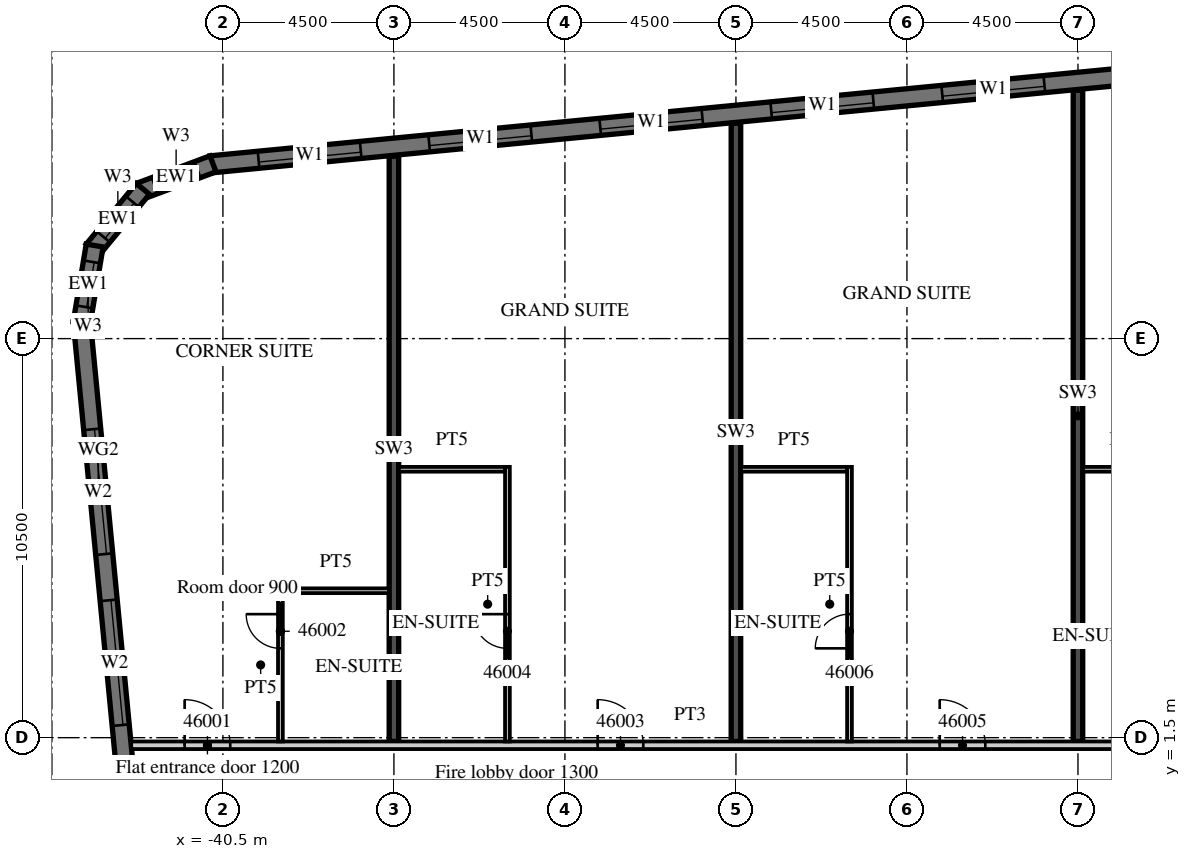
"""IFC4 building model, lengths in metres.
Left out: names, types, materials, properties, quantities, classifications, styles, units other than length and angle.
Written with IfcOpenShell. Run it as: python <this file> out.ifc"""

import sys

from ifc_helpers import new_model, si_unit, direction, frame, frame_2d, origin, place, context, subcontext, project, spatial, polyline, rectangle, outline, extrude, element, fill, save


model = new_model("IFC4")
c1 = context("Model", 3, precision=1e-05, world=origin(), true_north=direction((0.0, 1.0)))
c2 = subcontext(c1, "Body", "Model", "MODEL_VIEW")
j1 = project(units=[si_unit("LENGTHUNIT", "METRE"), si_unit("PLANEANGLEUNIT", "RADIAN")], contexts=[c1])
p1 = place(None, origin())
s1 = spatial("IfcSite", under=j1, at=p1, CompositionType="ELEMENT")
p2 = place(p1, origin())
s2 = spatial("IfcBuilding", under=s1, at=p2, CompositionType="ELEMENT")
p3 = place(p2, frame((0.0, 0.0, 193.3)))
s3 = spatial("IfcBuildingStorey", under=s2, at=p3, CompositionType="ELEMENT", Elevation=193.3)
p4 = place(p3, frame((-36.0, 1.4, 0.0), z_axis=(0.0, 0.0, 1.0), x_axis=(0.0, 1.0, 0.0)))
e1 = element("IfcWall", 1, at=p4, inside=s3, PredefinedType="SHEAR", context=c2, shape_type="SweptSolid", body=[
    extrude(rectangle(XDim=15.401, YDim=0.25, at=frame_2d((7.701, 0.0))), origin(), (0.0, 0.0, 1.0), 3.3),
])
p5 = place(p3, frame((-27.0, 1.4, 0.0), z_axis=(0.0, 0.0, 1.0), x_axis=(0.0, 1.0, 0.0)))
e2 = element("IfcWall", 2, at=p5, inside=s3, PredefinedType="SHEAR", context=c2, shape_type="SweptSolid", body=[
    extrude(rectangle(XDim=16.268, YDim=0.25, at=frame_2d((8.134, 0.0))), origin(), (0.0, 0.0, 1.0), 3.3),
])
p6 = place(p3, frame((-18.0, 1.4, 0.0), z_axis=(0.0, 0.0, 1.0), x_axis=(0.0, 1.0, 0.0)))
e3 = element("IfcWall", 3, at=p6, inside=s3, PredefinedType="SHEAR", context=c2, shape_type="SweptSolid", body=[
    extrude(rectangle(XDim=17.134, YDim=0.25, at=frame_2d((8.567, 0.0))), origin(), (0.0, 0.0, 1.0), 3.3),
])
p7 = place(p3, frame((-44.214, 12.466, 0.0), z_axis=(0.0, 0.0, 1.0), x_axis=(0.095847314626, -0.995396047952, 0.0)))
e4 = element("IfcWall", 4, at=p7, inside=s3, PredefinedType="SOLIDWALL", context=c2, shape_type="SweptSolid", body=[
    extrude(rectangle(XDim=34.0, YDim=0.45, at=frame_2d((17.0, 0.0))), origin(), (0.0, 0.0, 1.0), 3.02),
])
p8 = place(p7, frame((2.865, 0.0, 0.45)))
e5 = element("IfcOpeningElement", 5, at=p8, cuts=e4, PredefinedType="OPENING", context=c2, shape_type="SweptSolid", body=[
    extrude(rectangle(XDim=3.3, YDim=2.25, at=frame_2d((1.65, 1.125))), frame((0.0, 0.235, 0.0), z_axis=(0.0, -1.0, 0.0), x_axis=(1.0, 0.0, 0.0)), (0.0, 0.0, 1.0), 0.47),
])
p9 = place(p7, frame((7.386, 0.0, 0.45)))
e6 = element("IfcOpeningElement", 6, at=p9, cuts=e4, PredefinedType="OPENING", context=c2, shape_type="SweptSolid", body=[
    extrude(rectangle(XDim=3.3, YDim=2.25, at=frame_2d((1.65, 1.125))), frame((0.0, 0.235, 0.0), z_axis=(0.0, -1.0, 0.0), x_axis=(1.0, 0.0, 0.0)), (0.0, 0.0, 1.0), 0.47),
])
p10 = place(p3, frame((13.521, 21.817, 0.0), z_axis=(0.0, 0.0, 1.0), x_axis=(-0.995396508751, -0.095842529008, 0.0)))
e7 = element("IfcWall", 7, at=p10, inside=s3, PredefinedType="SOLIDWALL", context=c2, shape_type="SweptSolid", body=[
    extrude(rectangle(XDim=54.591, YDim=0.45, at=frame_2d((27.296, 0.0))), origin(), (0.0, 0.0, 1.0), 3.02),
])
p11 = place(p10, frame((0.91, 0.0, 0.45)))
e8 = element("IfcOpeningElement", 8, at=p11, cuts=e7, PredefinedType="OPENING", context=c2, shape_type="SweptSolid", body=[
    extrude(rectangle(XDim=2.7, YDim=2.25, at=frame_2d((1.35, 1.125))), frame((0.0, 0.235, 0.0), z_axis=(0.0, -1.0, 0.0), x_axis=(1.0, 0.0, 0.0)), (0.0, 0.0, 1.0), 0.47),
])
p12 = place(p10, frame((5.431, 0.0, 0.45)))
e9 = element("IfcOpeningElement", 9, at=p12, cuts=e7, PredefinedType="OPENING", context=c2, shape_type="SweptSolid", body=[
    extrude(rectangle(XDim=2.7, YDim=2.25, at=frame_2d((1.35, 1.125))), frame((0.0, 0.235, 0.0), z_axis=(0.0, -1.0, 0.0), x_axis=(1.0, 0.0, 0.0)), (0.0, 0.0, 1.0), 0.47),
])
p13 = place(p10, frame((9.952, 0.0, 0.45)))
e10 = element("IfcOpeningElement", 10, at=p13, cuts=e7, PredefinedType="OPENING", context=c2, shape_type="SweptSolid", body=[
    extrude(rectangle(XDim=2.7, YDim=2.25, at=frame_2d((1.35, 1.125))), frame((0.0, 0.235, 0.0), z_axis=(0.0, -1.0, 0.0), x_axis=(1.0, 0.0, 0.0)), (0.0, 0.0, 1.0), 0.47),
])
p14 = place(p10, frame((14.473, 0.0, 0.45)))
e11 = element("IfcOpeningElement", 11, at=p14, cuts=e7, PredefinedType="OPENING", context=c2, shape_type="SweptSolid", body=[
    extrude(rectangle(XDim=2.7, YDim=2.25, at=frame_2d((1.35, 1.125))), frame((0.0, 0.235, 0.0), z_axis=(0.0, -1.0, 0.0), x_axis=(1.0, 0.0, 0.0)), (0.0, 0.0, 1.0), 0.47),
])
p15 = place(p10, frame((18.994, 0.0, 0.45)))
e12 = element("IfcOpeningElement", 12, at=p15, cuts=e7, PredefinedType="OPENING", context=c2, shape_type="SweptSolid", body=[
    extrude(rectangle(XDim=2.7, YDim=2.25, at=frame_2d((1.35, 1.125))), frame((0.0, 0.235, 0.0), z_axis=(0.0, -1.0, 0.0), x_axis=(1.0, 0.0, 0.0)), (0.0, 0.0, 1.0), 0.47),
])
p16 = place(p10, frame((23.514, 0.0, 0.45)))
e13 = element("IfcOpeningElement", 13, at=p16, cuts=e7, PredefinedType="OPENING", context=c2, shape_type="SweptSolid", body=[
    extrude(rectangle(XDim=2.7, YDim=2.25, at=frame_2d((1.35, 1.125))), frame((0.0, 0.235, 0.0), z_axis=(0.0, -1.0, 0.0), x_axis=(1.0, 0.0, 0.0)), (0.0, 0.0, 1.0), 0.47),
])
p17 = place(p10, frame((28.035, 0.0, 0.45)))
e14 = element("IfcOpeningElement", 14, at=p17, cuts=e7, PredefinedType="OPENING", context=c2, shape_type="SweptSolid", body=[
    extrude(rectangle(XDim=2.7, YDim=2.25, at=frame_2d((1.35, 1.125))), frame((0.0, 0.235, 0.0), z_axis=(0.0, -1.0, 0.0), x_axis=(1.0, 0.0, 0.0)), (0.0, 0.0, 1.0), 0.47),
])
p18 = place(p10, frame((32.556, 0.0, 0.45)))
e15 = element("IfcOpeningElement", 15, at=p18, cuts=e7, PredefinedType="OPENING", context=c2, shape_type="SweptSolid", body=[
    extrude(rectangle(XDim=2.7, YDim=2.25, at=frame_2d((1.35, 1.125))), frame((0.0, 0.235, 0.0), z_axis=(0.0, -1.0, 0.0), x_axis=(1.0, 0.0, 0.0)), (0.0, 0.0, 1.0), 0.47),
])
p19 = place(p10, frame((37.077, 0.0, 0.45)))
e16 = element("IfcOpeningElement", 16, at=p19, cuts=e7, PredefinedType="OPENING", context=c2, shape_type="SweptSolid", body=[
    extrude(rectangle(XDim=2.7, YDim=2.25, at=frame_2d((1.35, 1.125))), frame((0.0, 0.235, 0.0), z_axis=(0.0, -1.0, 0.0), x_axis=(1.0, 0.0, 0.0)), (0.0, 0.0, 1.0), 0.47),
])
p20 = place(p10, frame((41.598, 0.0, 0.45)))
e17 = element("IfcOpeningElement", 17, at=p20, cuts=e7, PredefinedType="OPENING", context=c2, shape_type="SweptSolid", body=[
    extrude(rectangle(XDim=2.7, YDim=2.25, at=frame_2d((1.35, 1.125))), frame((0.0, 0.235, 0.0), z_axis=(0.0, -1.0, 0.0), x_axis=(1.0, 0.0, 0.0)), (0.0, 0.0, 1.0), 0.47),
])
p21 = place(p10, frame((46.118, 0.0, 0.45)))
e18 = element("IfcOpeningElement", 18, at=p21, cuts=e7, PredefinedType="OPENING", context=c2, shape_type="SweptSolid", body=[
    extrude(rectangle(XDim=2.7, YDim=2.25, at=frame_2d((1.35, 1.125))), frame((0.0, 0.235, 0.0), z_axis=(0.0, -1.0, 0.0), x_axis=(1.0, 0.0, 0.0)), (0.0, 0.0, 1.0), 0.47),
])
p22 = place(p10, frame((50.629, 0.0, 0.45)))
e19 = element("IfcOpeningElement", 19, at=p22, cuts=e7, PredefinedType="OPENING", context=c2, shape_type="SweptSolid", body=[
    extrude(rectangle(XDim=2.7, YDim=2.25, at=frame_2d((1.35, 1.125))), frame((0.0, 0.235, 0.0), z_axis=(0.0, -1.0, 0.0), x_axis=(1.0, 0.0, 0.0)), (0.0, 0.0, 1.0), 0.47),
])
p23 = place(p3, frame((-40.761, 16.598, 0.0), z_axis=(0.0, 0.0, 1.0), x_axis=(-0.936677599948, -0.350192909346, 0.0)))
e20 = element("IfcWall", 20, at=p23, inside=s3, PredefinedType="SOLIDWALL", context=c2, shape_type="SweptSolid", body=[
    extrude(outline(polyline([(0.0, -0.225), (2.071, -0.225), (1.95, 0.225), (0.121, 0.225), (0.0, -0.225)])), origin(), (0.0, 0.0, 1.0), 3.02),
])
p24 = place(p23, frame((0.435, 0.0, 0.45)))
e21 = element("IfcOpeningElement", 21, at=p24, cuts=e20, PredefinedType="OPENING", context=c2, shape_type="SweptSolid", body=[
    extrude(rectangle(XDim=1.2, YDim=2.25, at=frame_2d((0.6, 1.125))), frame((0.0, 0.235, 0.0), z_axis=(0.0, -1.0, 0.0), x_axis=(1.0, 0.0, 0.0)), (0.0, 0.0, 1.0), 0.47),
])
p25 = place(p3, frame((-42.606, 15.941, 0.0), z_axis=(0.0, 0.0, 1.0), x_axis=(-0.636116318187, -0.771593176315, 0.0)))
e22 = element("IfcWall", 22, at=p25, inside=s3, PredefinedType="SOLIDWALL", context=c2, shape_type="SweptSolid", body=[
    extrude(outline(polyline([(0.0, -0.225), (2.071, -0.225), (1.95, 0.225), (0.121, 0.225), (0.0, -0.225)])), origin(), (0.0, 0.0, 1.0), 3.02),
])
p26 = place(p25, frame((0.435, 0.0, 0.45)))
e23 = element("IfcOpeningElement", 23, at=p26, cuts=e22, PredefinedType="OPENING", context=c2, shape_type="SweptSolid", body=[
    extrude(rectangle(XDim=1.2, YDim=2.25, at=frame_2d((0.6, 1.125))), frame((0.0, 0.235, 0.0), z_axis=(0.0, -1.0, 0.0), x_axis=(1.0, 0.0, 0.0)), (0.0, 0.0, 1.0), 0.47),
])
p27 = place(p3, frame((-43.875, 14.449, 0.0), z_axis=(0.0, 0.0, 1.0), x_axis=(-0.164953448126, -0.986301353518, 0.0)))
e24 = element("IfcWall", 24, at=p27, inside=s3, PredefinedType="SOLIDWALL", context=c2, shape_type="SweptSolid", body=[
    extrude(outline(polyline([(0.0, -0.225), (2.071, -0.225), (1.95, 0.225), (0.121, 0.225), (0.0, -0.225)])), origin(), (0.0, 0.0, 1.0), 3.02),
])
p28 = place(p27, frame((0.435, 0.0, 0.45)))
e25 = element("IfcOpeningElement", 25, at=p28, cuts=e24, PredefinedType="OPENING", context=c2, shape_type="SweptSolid", body=[
    extrude(rectangle(XDim=1.2, YDim=2.25, at=frame_2d((0.6, 1.125))), frame((0.0, 0.235, 0.0), z_axis=(0.0, -1.0, 0.0), x_axis=(1.0, 0.0, 0.0)), (0.0, 0.0, 1.0), 0.47),
])
p29 = place(p3, frame((-42.913, 1.3, 0.0), z_axis=(0.0, 0.0, 1.0), x_axis=(1.0, 0.0, 0.0)))
e26 = element("IfcWall", 26, at=p29, inside=s3, PredefinedType="PARTITIONING", context=c2, shape_type="SweptSolid", body=[
    extrude(rectangle(XDim=29.413, YDim=0.2, at=frame_2d((14.707, 0.0))), origin(), (0.0, 0.0, 1.0), 3.02),
])
p30 = place(p29, frame((1.406, 0.0, 0.0)))
e27 = element("IfcOpeningElement", 27, at=p30, cuts=e26, PredefinedType="OPENING", context=c2, shape_type="SweptSolid", body=[
    extrude(rectangle(XDim=1.2, YDim=2.1, at=frame_2d((0.6, 1.05))), frame((0.0, 0.11, 0.0), z_axis=(0.0, -1.0, 0.0), x_axis=(1.0, 0.0, 0.0)), (0.0, 0.0, 1.0), 0.22),
])
p31 = place(p29, frame((12.275, 0.0, 0.0)))
e28 = element("IfcOpeningElement", 28, at=p31, cuts=e26, PredefinedType="OPENING", context=c2, shape_type="SweptSolid", body=[
    extrude(rectangle(XDim=1.2, YDim=2.1, at=frame_2d((0.6, 1.05))), frame((0.0, 0.11, 0.0), z_axis=(0.0, -1.0, 0.0), x_axis=(1.0, 0.0, 0.0)), (0.0, 0.0, 1.0), 0.22),
])
p32 = place(p29, frame((21.275, 0.0, 0.0)))
e29 = element("IfcOpeningElement", 29, at=p32, cuts=e26, PredefinedType="OPENING", context=c2, shape_type="SweptSolid", body=[
    extrude(rectangle(XDim=1.2, YDim=2.1, at=frame_2d((0.6, 1.05))), frame((0.0, 0.11, 0.0), z_axis=(0.0, -1.0, 0.0), x_axis=(1.0, 0.0, 0.0)), (0.0, 0.0, 1.0), 0.22),
])
p33 = place(p29, frame((27.838, 0.0, 0.0)))
e30 = element("IfcOpeningElement", 30, at=p33, cuts=e26, PredefinedType="OPENING", context=c2, shape_type="SweptSolid", body=[
    extrude(rectangle(XDim=1.0, YDim=2.1, at=frame_2d((0.5, 1.05))), frame((0.0, 0.11, 0.0), z_axis=(0.0, -1.0, 0.0), x_axis=(1.0, 0.0, 0.0)), (0.0, 0.0, 1.0), 0.22),
])
p34 = place(p3, frame((-38.987, 1.4, 0.0), z_axis=(0.0, 0.0, 1.0), x_axis=(0.0, 1.0, 0.0)))
e31 = element("IfcWall", 31, at=p34, inside=s3, PredefinedType="PARTITIONING", context=c2, shape_type="SweptSolid", body=[
    extrude(rectangle(XDim=4.028, YDim=0.125, at=frame_2d((2.014, 0.0))), origin(), (0.0, 0.0, 1.0), 3.02),
])
p35 = place(p34, frame((2.45, 0.0, 0.0)))
e32 = element("IfcOpeningElement", 32, at=p35, cuts=e31, PredefinedType="OPENING", context=c2, shape_type="SweptSolid", body=[
    extrude(rectangle(XDim=0.9, YDim=2.1, at=frame_2d((0.45, 1.05))), frame((0.0, 0.073, 0.0), z_axis=(0.0, -1.0, 0.0), x_axis=(1.0, 0.0, 0.0)), (0.0, 0.0, 1.0), 0.145),
])
p36 = place(p3, frame((-38.925, 5.366, 0.0), z_axis=(0.0, 0.0, 1.0), x_axis=(1.0, 0.0, 0.0)))
e33 = element("IfcWall", 33, at=p36, inside=s3, PredefinedType="PARTITIONING", context=c2, shape_type="SweptSolid", body=[
    extrude(rectangle(XDim=2.8, YDim=0.125, at=frame_2d((1.4, 0.0))), origin(), (0.0, 0.0, 1.0), 3.02),
])
p37 = place(p3, frame((-33.013, 1.4, 0.0), z_axis=(0.0, 0.0, 1.0), x_axis=(0.0, 1.0, 0.0)))
e34 = element("IfcWall", 34, at=p37, inside=s3, PredefinedType="PARTITIONING", context=c2, shape_type="SweptSolid", body=[
    extrude(rectangle(XDim=7.225, YDim=0.125, at=frame_2d((3.613, 0.0))), origin(), (0.0, 0.0, 1.0), 3.02),
])
p38 = place(p37, frame((2.45, 0.0, 0.0)))
e35 = element("IfcOpeningElement", 35, at=p38, cuts=e34, PredefinedType="OPENING", context=c2, shape_type="SweptSolid", body=[
    extrude(rectangle(XDim=0.9, YDim=2.1, at=frame_2d((0.45, 1.05))), frame((0.0, 0.073, 0.0), z_axis=(0.0, -1.0, 0.0), x_axis=(1.0, 0.0, 0.0)), (0.0, 0.0, 1.0), 0.145),
])
p39 = place(p3, frame((-35.875, 8.562, 0.0), z_axis=(0.0, 0.0, 1.0), x_axis=(1.0, 0.0, 0.0)))
e36 = element("IfcWall", 36, at=p39, inside=s3, PredefinedType="PARTITIONING", context=c2, shape_type="SweptSolid", body=[
    extrude(rectangle(XDim=2.8, YDim=0.125, at=frame_2d((1.4, 0.0))), origin(), (0.0, 0.0, 1.0), 3.02),
])
p40 = place(p3, frame((-24.012, 1.4, 0.0), z_axis=(0.0, 0.0, 1.0), x_axis=(0.0, 1.0, 0.0)))
e37 = element("IfcWall", 37, at=p40, inside=s3, PredefinedType="PARTITIONING", context=c2, shape_type="SweptSolid", body=[
    extrude(rectangle(XDim=7.225, YDim=0.125, at=frame_2d((3.613, 0.0))), origin(), (0.0, 0.0, 1.0), 3.02),
])
p41 = place(p40, frame((2.45, 0.0, 0.0)))
e38 = element("IfcOpeningElement", 38, at=p41, cuts=e37, PredefinedType="OPENING", context=c2, shape_type="SweptSolid", body=[
    extrude(rectangle(XDim=0.9, YDim=2.1, at=frame_2d((0.45, 1.05))), frame((0.0, 0.073, 0.0), z_axis=(0.0, -1.0, 0.0), x_axis=(1.0, 0.0, 0.0)), (0.0, 0.0, 1.0), 0.145),
])
p42 = place(p3, frame((-26.875, 8.562, 0.0), z_axis=(0.0, 0.0, 1.0), x_axis=(1.0, 0.0, 0.0)))
e39 = element("IfcWall", 39, at=p42, inside=s3, PredefinedType="PARTITIONING", context=c2, shape_type="SweptSolid", body=[
    extrude(rectangle(XDim=2.8, YDim=0.125, at=frame_2d((1.4, 0.0))), origin(), (0.0, 0.0, 1.0), 3.02),
])
p43 = place(p3, frame((-17.875, 8.562, 0.0), z_axis=(0.0, 0.0, 1.0), x_axis=(1.0, 0.0, 0.0)))
e40 = element("IfcWall", 40, at=p43, inside=s3, PredefinedType="PARTITIONING", context=c2, shape_type="SweptSolid", body=[
    extrude(rectangle(XDim=2.25, YDim=0.125, at=frame_2d((1.125, 0.0))), origin(), (0.0, 0.0, 1.0), 3.02),
])
p44 = place(p8, origin())
e41 = element("IfcWindow", 41, at=p44, inside=s3, PartitioningType="SINGLE_PANEL", PredefinedType="WINDOW", context=c2, shape_type="SweptSolid", body=[
    extrude(rectangle(XDim=3.3, YDim=2.25, at=frame_2d((1.65, 1.125))), frame((0.0, 0.09, 0.0), z_axis=(0.0, -1.0, 0.0), x_axis=(1.0, 0.0, 0.0)), (0.0, 0.0, 1.0), 0.06),
])
fill(e5, e41)
p45 = place(p9, origin())
e42 = element("IfcWindow", 42, at=p45, inside=s3, PartitioningType="SINGLE_PANEL", PredefinedType="WINDOW", context=c2, shape_type="SweptSolid", body=[
    extrude(rectangle(XDim=3.3, YDim=2.25, at=frame_2d((1.65, 1.125))), frame((0.0, 0.09, 0.0), z_axis=(0.0, -1.0, 0.0), x_axis=(1.0, 0.0, 0.0)), (0.0, 0.0, 1.0), 0.06),
])
fill(e6, e42)
p46 = place(p18, origin())
e43 = element("IfcWindow", 43, at=p46, inside=s3, PartitioningType="SINGLE_PANEL", PredefinedType="WINDOW", context=c2, shape_type="SweptSolid", body=[
    extrude(rectangle(XDim=2.7, YDim=2.25, at=frame_2d((1.35, 1.125))), frame((0.0, 0.09, 0.0), z_axis=(0.0, -1.0, 0.0), x_axis=(1.0, 0.0, 0.0)), (0.0, 0.0, 1.0), 0.06),
])
fill(e15, e43)
p47 = place(p19, origin())
e44 = element("IfcWindow", 44, at=p47, inside=s3, PartitioningType="SINGLE_PANEL", PredefinedType="WINDOW", context=c2, shape_type="SweptSolid", body=[
    extrude(rectangle(XDim=2.7, YDim=2.25, at=frame_2d((1.35, 1.125))), frame((0.0, 0.09, 0.0), z_axis=(0.0, -1.0, 0.0), x_axis=(1.0, 0.0, 0.0)), (0.0, 0.0, 1.0), 0.06),
])
fill(e16, e44)
p48 = place(p20, origin())
e45 = element("IfcWindow", 45, at=p48, inside=s3, PartitioningType="SINGLE_PANEL", PredefinedType="WINDOW", context=c2, shape_type="SweptSolid", body=[
    extrude(rectangle(XDim=2.7, YDim=2.25, at=frame_2d((1.35, 1.125))), frame((0.0, 0.09, 0.0), z_axis=(0.0, -1.0, 0.0), x_axis=(1.0, 0.0, 0.0)), (0.0, 0.0, 1.0), 0.06),
])
fill(e17, e45)
p49 = place(p21, origin())
e46 = element("IfcWindow", 46, at=p49, inside=s3, PartitioningType="SINGLE_PANEL", PredefinedType="WINDOW", context=c2, shape_type="SweptSolid", body=[
    extrude(rectangle(XDim=2.7, YDim=2.25, at=frame_2d((1.35, 1.125))), frame((0.0, 0.09, 0.0), z_axis=(0.0, -1.0, 0.0), x_axis=(1.0, 0.0, 0.0)), (0.0, 0.0, 1.0), 0.06),
])
fill(e18, e46)
p50 = place(p22, origin())
e47 = element("IfcWindow", 47, at=p50, inside=s3, PartitioningType="SINGLE_PANEL", PredefinedType="WINDOW", context=c2, shape_type="SweptSolid", body=[
    extrude(rectangle(XDim=2.7, YDim=2.25, at=frame_2d((1.35, 1.125))), frame((0.0, 0.09, 0.0), z_axis=(0.0, -1.0, 0.0), x_axis=(1.0, 0.0, 0.0)), (0.0, 0.0, 1.0), 0.06),
])
fill(e19, e47)
p51 = place(p24, origin())
e48 = element("IfcWindow", 48, at=p51, inside=s3, PartitioningType="SINGLE_PANEL", PredefinedType="WINDOW", context=c2, shape_type="SweptSolid", body=[
    extrude(rectangle(XDim=1.2, YDim=2.25, at=frame_2d((0.6, 1.125))), frame((0.0, 0.09, 0.0), z_axis=(0.0, -1.0, 0.0), x_axis=(1.0, 0.0, 0.0)), (0.0, 0.0, 1.0), 0.06),
])
fill(e21, e48)
p52 = place(p26, origin())
e49 = element("IfcWindow", 49, at=p52, inside=s3, PartitioningType="SINGLE_PANEL", PredefinedType="WINDOW", context=c2, shape_type="SweptSolid", body=[
    extrude(rectangle(XDim=1.2, YDim=2.25, at=frame_2d((0.6, 1.125))), frame((0.0, 0.09, 0.0), z_axis=(0.0, -1.0, 0.0), x_axis=(1.0, 0.0, 0.0)), (0.0, 0.0, 1.0), 0.06),
])
fill(e23, e49)
p53 = place(p28, origin())
e50 = element("IfcWindow", 50, at=p53, inside=s3, PartitioningType="SINGLE_PANEL", PredefinedType="WINDOW", context=c2, shape_type="SweptSolid", body=[
    extrude(rectangle(XDim=1.2, YDim=2.25, at=frame_2d((0.6, 1.125))), frame((0.0, 0.09, 0.0), z_axis=(0.0, -1.0, 0.0), x_axis=(1.0, 0.0, 0.0)), (0.0, 0.0, 1.0), 0.06),
])
fill(e25, e50)
p54 = place(p30, origin())
e51 = element("IfcDoor", 51, at=p54, inside=s3, OperationType="SINGLE_SWING_LEFT", PredefinedType="DOOR", context=c2, shape_type="SweptSolid", body=[
    extrude(rectangle(XDim=1.2, YDim=2.1, at=frame_2d((0.6, 1.05))), frame((0.0, 0.025, 0.0), z_axis=(0.0, -1.0, 0.0), x_axis=(1.0, 0.0, 0.0)), (0.0, 0.0, 1.0), 0.05),
])
fill(e27, e51)
p55 = place(p35, origin())
e52 = element("IfcDoor", 52, at=p55, inside=s3, OperationType="SINGLE_SWING_RIGHT", PredefinedType="DOOR", context=c2, shape_type="SweptSolid", body=[
    extrude(rectangle(XDim=0.9, YDim=2.1, at=frame_2d((0.45, 1.05))), frame((0.0, 0.025, 0.0), z_axis=(0.0, -1.0, 0.0), x_axis=(1.0, 0.0, 0.0)), (0.0, 0.0, 1.0), 0.05),
])
fill(e32, e52)
p56 = place(p31, origin())
e53 = element("IfcDoor", 53, at=p56, inside=s3, OperationType="SINGLE_SWING_LEFT", PredefinedType="DOOR", context=c2, shape_type="SweptSolid", body=[
    extrude(rectangle(XDim=1.2, YDim=2.1, at=frame_2d((0.6, 1.05))), frame((0.0, 0.025, 0.0), z_axis=(0.0, -1.0, 0.0), x_axis=(1.0, 0.0, 0.0)), (0.0, 0.0, 1.0), 0.05),
])
fill(e28, e53)
p57 = place(p38, origin())
e54 = element("IfcDoor", 54, at=p57, inside=s3, OperationType="SINGLE_SWING_RIGHT", PredefinedType="DOOR", context=c2, shape_type="SweptSolid", body=[
    extrude(rectangle(XDim=0.9, YDim=2.1, at=frame_2d((0.45, 1.05))), frame((0.0, 0.025, 0.0), z_axis=(0.0, -1.0, 0.0), x_axis=(1.0, 0.0, 0.0)), (0.0, 0.0, 1.0), 0.05),
])
fill(e35, e54)
p58 = place(p32, origin())
e55 = element("IfcDoor", 55, at=p58, inside=s3, OperationType="SINGLE_SWING_LEFT", PredefinedType="DOOR", context=c2, shape_type="SweptSolid", body=[
    extrude(rectangle(XDim=1.2, YDim=2.1, at=frame_2d((0.6, 1.05))), frame((0.0, 0.025, 0.0), z_axis=(0.0, -1.0, 0.0), x_axis=(1.0, 0.0, 0.0)), (0.0, 0.0, 1.0), 0.05),
])
fill(e29, e55)
p59 = place(p41, origin())
e56 = element("IfcDoor", 56, at=p59, inside=s3, OperationType="SINGLE_SWING_LEFT", PredefinedType="DOOR", context=c2, shape_type="SweptSolid", body=[
    extrude(rectangle(XDim=0.9, YDim=2.1, at=frame_2d((0.45, 1.05))), frame((0.0, 0.025, 0.0), z_axis=(0.0, -1.0, 0.0), x_axis=(1.0, 0.0, 0.0)), (0.0, 0.0, 1.0), 0.05),
])
fill(e38, e56)
save(model, sys.argv[1])
